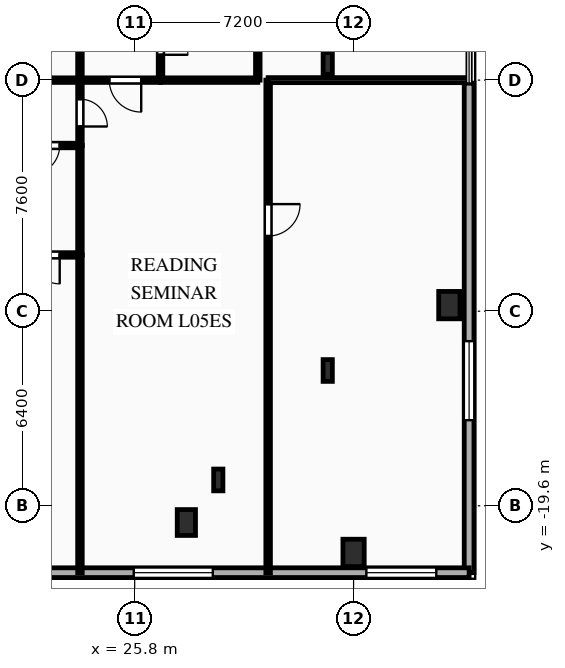
"""IFC4 building model, lengths in metres.
Left out: names, types, materials, properties, quantities, classifications, styles, units other than length and angle.
Written with IfcOpenShell. Run it as: python <this file> out.ifc"""

import sys

from ifc_helpers import new_model, si_unit, direction, frame, frame_2d, origin, origin_2d, place, context, subcontext, project, spatial, rectangle, i_section, extrude, element, fill, save


model = new_model("IFC4")
c1 = context("Model", 3, precision=1e-05, world=origin(), true_north=direction((0.0, 1.0)))
c2 = subcontext(c1, "Body", "Model", "MODEL_VIEW")
j1 = project(units=[si_unit("LENGTHUNIT", "METRE"), si_unit("PLANEANGLEUNIT", "RADIAN")], contexts=[c1])
p1 = place(None, origin())
s1 = spatial("IfcSite", under=j1, at=p1, CompositionType="ELEMENT")
p2 = place(p1, origin())
s2 = spatial("IfcBuilding", under=s1, at=p2, CompositionType="ELEMENT")
p3 = place(p2, frame((0.0, 0.0, 22.5)))
s3 = spatial("IfcBuildingStorey", under=s2, at=p3, CompositionType="ELEMENT", Elevation=22.5)
for number, where, z_axis, x_axis in (
    (1, (33.0, -21.15, 0.0), (0.0, 0.0, 1.0), (1.0, 0.0, 0.0)),
    (2, (36.15, -13.0, 0.0), (0.0, 0.0, 1.0), (1.0, 0.0, 0.0)),
):
    element("IfcColumn", number, at=place(p3, frame(where, z_axis=z_axis, x_axis=x_axis)), inside=s3, PredefinedType="COLUMN", context=c2, shape_type="SweptSolid", body=[
        extrude(rectangle(XDim=0.7, YDim=0.9, at=origin_2d()), origin(), (0.0, 0.0, 1.0), 4.5),
    ])
p4 = place(p3, frame((27.5, -20.15, 0.0), z_axis=(0.0, 0.0, 1.0), x_axis=(1.0, 0.0, 0.0)))
e3 = element("IfcColumn", 3, at=p4, inside=s3, PredefinedType="PILASTER", context=c2, shape_type="SweptSolid", body=[
    extrude(rectangle(XDim=0.6, YDim=0.85, at=origin_2d()), origin(), (0.0, 0.0, 1.0), 4.5),
])
for number, where, z_axis, x_axis in (
    (4, (28.55, -18.75, 0.0), (0.0, 0.0, 1.0), (1.0, 0.0, 0.0)),
    (5, (32.15, -15.15, 0.0), (0.0, 0.0, 1.0), (1.0, 0.0, 0.0)),
    (6, (32.15, -5.05, 0.0), (0.0, 0.0, 1.0), (1.0, 0.0, 0.0)),
):
    element("IfcColumn", number, at=place(p3, frame(where, z_axis=z_axis, x_axis=x_axis)), inside=s3, PredefinedType="COLUMN", context=c2, shape_type="SweptSolid", body=[
        extrude(i_section(OverallWidth=0.304, OverallDepth=0.716, WebThickness=0.021, FlangeThickness=0.04, FilletRadius=0.027, at=origin_2d()), origin(), (0.0, 0.0, 1.0), 4.5),
    ])
p5 = place(p3, frame((36.8, -5.7, 0.0), z_axis=(0.0, 0.0, 1.0), x_axis=(0.0, -1.0, 0.0)))
e7 = element("IfcWall", 7, at=p5, inside=s3, PredefinedType="SOLIDWALL", context=c2, shape_type="SweptSolid", body=[
    extrude(rectangle(XDim=16.1, YDim=0.32, at=frame_2d((8.05, 0.0))), origin(), (0.0, 0.0, 1.0), 4.16),
])
p6 = place(p5, frame((8.485, 0.0, 0.85)))
e8 = element("IfcOpeningElement", 8, at=p6, cuts=e7, PredefinedType="OPENING", context=c2, shape_type="SweptSolid", body=[
    extrude(rectangle(XDim=2.6, YDim=2.4, at=frame_2d((1.3, 1.2))), frame((0.0, 0.17, 0.0), z_axis=(0.0, -1.0, 0.0), x_axis=(1.0, 0.0, 0.0)), (0.0, 0.0, 1.0), 0.34),
])
p7 = place(p3, frame((36.8, -21.8, 0.0), z_axis=(0.0, 0.0, 1.0), x_axis=(-1.0, 0.0, 0.0)))
e9 = element("IfcWall", 9, at=p7, inside=s3, PredefinedType="SOLIDWALL", context=c2, shape_type="SweptSolid", body=[
    extrude(rectangle(XDim=73.6, YDim=0.32, at=frame_2d((36.8, 0.0))), origin(), (0.0, 0.0, 1.0), 4.16),
])
p8 = place(p7, frame((1.079, 0.0, 0.85)))
e10 = element("IfcOpeningElement", 10, at=p8, cuts=e9, PredefinedType="OPENING", context=c2, shape_type="SweptSolid", body=[
    extrude(rectangle(XDim=2.3, YDim=2.4, at=frame_2d((1.15, 1.2))), frame((0.0, 0.17, 0.0), z_axis=(0.0, -1.0, 0.0), x_axis=(1.0, 0.0, 0.0)), (0.0, 0.0, 1.0), 0.34),
])
p9 = place(p7, frame((8.431, 0.0, 0.85)))
e11 = element("IfcOpeningElement", 11, at=p9, cuts=e9, PredefinedType="OPENING", context=c2, shape_type="SweptSolid", body=[
    extrude(rectangle(XDim=2.6, YDim=2.4, at=frame_2d((1.3, 1.2))), frame((0.0, 0.17, 0.0), z_axis=(0.0, -1.0, 0.0), x_axis=(1.0, 0.0, 0.0)), (0.0, 0.0, 1.0), 0.34),
])
p10 = place(p7, frame((29.293, 0.0, 0.85)))
e12 = element("IfcOpeningElement", 12, at=p10, cuts=e9, PredefinedType="OPENING", context=c2, shape_type="SweptSolid", body=[
    extrude(rectangle(XDim=2.6, YDim=2.4, at=frame_2d((1.3, 1.2))), frame((0.0, 0.17, 0.0), z_axis=(0.0, -1.0, 0.0), x_axis=(1.0, 0.0, 0.0)), (0.0, 0.0, 1.0), 0.34),
])
p11 = place(p7, frame((49.195, 0.0, 0.85)))
e13 = element("IfcOpeningElement", 13, at=p11, cuts=e9, PredefinedType="OPENING", context=c2, shape_type="SweptSolid", body=[
    extrude(rectangle(XDim=2.6, YDim=2.4, at=frame_2d((1.3, 1.2))), frame((0.0, 0.17, 0.0), z_axis=(0.0, -1.0, 0.0), x_axis=(1.0, 0.0, 0.0)), (0.0, 0.0, 1.0), 0.34),
])
p12 = place(p7, frame((62.649, 0.0, 0.85)))
e14 = element("IfcOpeningElement", 14, at=p12, cuts=e9, PredefinedType="OPENING", context=c2, shape_type="SweptSolid", body=[
    extrude(rectangle(XDim=2.6, YDim=2.4, at=frame_2d((1.3, 1.2))), frame((0.0, 0.17, 0.0), z_axis=(0.0, -1.0, 0.0), x_axis=(1.0, 0.0, 0.0)), (0.0, 0.0, 1.0), 0.34),
])
p13 = place(p7, frame((70.301, 0.0, 0.85)))
e15 = element("IfcOpeningElement", 15, at=p13, cuts=e9, PredefinedType="OPENING", context=c2, shape_type="SweptSolid", body=[
    extrude(rectangle(XDim=2.3, YDim=2.4, at=frame_2d((1.15, 1.2))), frame((0.0, 0.17, 0.0), z_axis=(0.0, -1.0, 0.0), x_axis=(1.0, 0.0, 0.0)), (0.0, 0.0, 1.0), 0.34),
])
p14 = place(p3, frame((24.0, -5.6, 0.0), z_axis=(0.0, 0.0, 1.0), x_axis=(0.0, -1.0, 0.0)))
e16 = element("IfcWall", 16, at=p14, inside=s3, PredefinedType="PARTITIONING", context=c2, shape_type="SweptSolid", body=[
    extrude(rectangle(XDim=2.15, YDim=0.15, at=frame_2d((1.075, 0.0))), origin(), (0.0, 0.0, 1.0), 4.16),
])
p15 = place(p14, frame((0.625, 0.0, 0.0)))
e17 = element("IfcOpeningElement", 17, at=p15, cuts=e16, PredefinedType="OPENING", context=c2, shape_type="SweptSolid", body=[
    extrude(rectangle(XDim=0.9, YDim=2.1, at=frame_2d((0.45, 1.05))), frame((0.0, 0.085, 0.0), z_axis=(0.0, -1.0, 0.0), x_axis=(1.0, 0.0, 0.0)), (0.0, 0.0, 1.0), 0.17),
])
p16 = place(p3, frame((18.8, -5.6, 0.0), z_axis=(0.0, 0.0, 1.0), x_axis=(1.0, 0.0, 0.0)))
e18 = element("IfcWall", 18, at=p16, inside=s3, PredefinedType="PARTITIONING", context=c2, shape_type="SweptSolid", body=[
    extrude(rectangle(XDim=5.2, YDim=0.15, at=frame_2d((2.6, 0.0))), origin(), (0.0, 0.0, 1.0), 4.16),
])
p17 = place(p3, frame((24.0, -7.75, 0.0), z_axis=(0.0, 0.0, 1.0), x_axis=(-1.0, 0.0, 0.0)))
e19 = element("IfcWall", 19, at=p17, inside=s3, PredefinedType="PARTITIONING", context=c2, shape_type="SweptSolid", body=[
    extrude(rectangle(XDim=2.8, YDim=0.15, at=frame_2d((1.4, 0.0))), origin(), (0.0, 0.0, 1.0), 4.16),
])
p18 = place(p17, frame((0.666, 0.0, 0.0)))
e20 = element("IfcOpeningElement", 20, at=p18, cuts=e19, PredefinedType="OPENING", context=c2, shape_type="SweptSolid", body=[
    extrude(rectangle(XDim=0.95, YDim=2.1, at=frame_2d((0.475, 1.05))), frame((0.0, 0.085, 0.0), z_axis=(0.0, -1.0, 0.0), x_axis=(1.0, 0.0, 0.0)), (0.0, 0.0, 1.0), 0.17),
])
p19 = place(p3, frame((26.65, -5.6, 0.0), z_axis=(0.0, 0.0, 1.0), x_axis=(-1.0, 0.0, 0.0)))
e21 = element("IfcWall", 21, at=p19, inside=s3, PredefinedType="PARTITIONING", context=c2, shape_type="SweptSolid", body=[
    extrude(rectangle(XDim=2.65, YDim=0.15, at=frame_2d((1.325, 0.0))), origin(), (0.0, 0.0, 1.0), 4.16),
])
p20 = place(p19, frame((0.635, 0.0, 0.0)))
e22 = element("IfcOpeningElement", 22, at=p20, cuts=e21, PredefinedType="OPENING", context=c2, shape_type="SweptSolid", body=[
    extrude(rectangle(XDim=1.05, YDim=2.15, at=frame_2d((0.525, 1.075))), frame((0.0, 0.085, 0.0), z_axis=(0.0, -1.0, 0.0), x_axis=(1.0, 0.0, 0.0)), (0.0, 0.0, 1.0), 0.17),
])
p21 = place(p3, frame((26.65, -3.25, 0.0), z_axis=(0.0, 0.0, 1.0), x_axis=(0.0, -1.0, 0.0)))
e23 = element("IfcWall", 23, at=p21, inside=s3, PredefinedType="PLUMBINGWALL", context=c2, shape_type="SweptSolid", body=[
    extrude(rectangle(XDim=2.35, YDim=0.15, at=frame_2d((1.175, 0.0))), origin(), (0.0, 0.0, 1.0), 4.16),
])
p22 = place(p21, frame((0.616, 0.0, 0.0)))
e24 = element("IfcOpeningElement", 24, at=p22, cuts=e23, PredefinedType="OPENING", context=c2, shape_type="SweptSolid", body=[
    extrude(rectangle(XDim=0.9, YDim=2.1, at=frame_2d((0.45, 1.05))), frame((0.0, 0.085, 0.0), z_axis=(0.0, -1.0, 0.0), x_axis=(1.0, 0.0, 0.0)), (0.0, 0.0, 1.0), 0.17),
])
p23 = place(p3, frame((24.0, -5.6, 0.0), z_axis=(0.0, 0.0, 1.0), x_axis=(0.0, 1.0, 0.0)))
e25 = element("IfcWall", 25, at=p23, inside=s3, PredefinedType="PARTITIONING", context=c2, shape_type="SweptSolid", body=[
    extrude(rectangle(XDim=14.1, YDim=0.15, at=frame_2d((7.05, 0.0))), origin(), (0.0, 0.0, 1.0), 4.16),
])
p24 = place(p3, frame((30.19, -5.6, 0.0), z_axis=(0.0, 0.0, 1.0), x_axis=(0.0, -1.0, 0.0)))
e26 = element("IfcWall", 26, at=p24, inside=s3, PredefinedType="PARTITIONING", context=c2, shape_type="SweptSolid", body=[
    extrude(rectangle(XDim=16.2, YDim=0.15, at=frame_2d((8.1, 0.0))), origin(), (0.0, 0.0, 1.0), 4.16),
])
p25 = place(p24, frame((4.077, 0.0, 0.0)))
e27 = element("IfcOpeningElement", 27, at=p25, cuts=e26, PredefinedType="OPENING", context=c2, shape_type="SweptSolid", body=[
    extrude(rectangle(XDim=1.05, YDim=2.15, at=frame_2d((0.525, 1.075))), frame((0.0, 0.085, 0.0), z_axis=(0.0, -1.0, 0.0), x_axis=(1.0, 0.0, 0.0)), (0.0, 0.0, 1.0), 0.17),
])
p26 = place(p3, frame((26.65, -5.6, 0.0), z_axis=(0.0, 0.0, 1.0), x_axis=(1.0, 0.0, 0.0)))
e28 = element("IfcWall", 28, at=p26, inside=s3, PredefinedType="PLUMBINGWALL", context=c2, shape_type="SweptSolid", body=[
    extrude(rectangle(XDim=3.2, YDim=0.15, at=frame_2d((1.6, 0.0))), origin(), (0.0, 0.0, 1.0), 4.16),
])
p27 = place(p3, frame((24.0, -11.35, 0.0), z_axis=(0.0, 0.0, 1.0), x_axis=(0.0, 1.0, 0.0)))
e29 = element("IfcWall", 29, at=p27, inside=s3, PredefinedType="PARTITIONING", context=c2, shape_type="SweptSolid", body=[
    extrude(rectangle(XDim=3.6, YDim=0.15, at=frame_2d((1.8, 0.0))), origin(), (0.0, 0.0, 1.0), 4.16),
])
p28 = place(p3, frame((24.0, -21.8, 0.0), z_axis=(0.0, 0.0, 1.0), x_axis=(0.0, 1.0, 0.0)))
e30 = element("IfcWall", 30, at=p28, inside=s3, PredefinedType="PARTITIONING", context=c2, shape_type="SweptSolid", body=[
    extrude(rectangle(XDim=10.45, YDim=0.15, at=frame_2d((5.225, 0.0))), origin(), (0.0, 0.0, 1.0), 4.16),
])
p29 = place(p3, frame((30.19, -5.6, 0.0), z_axis=(0.0, 0.0, 1.0), x_axis=(1.0, 0.0, 0.0)))
e31 = element("IfcWall", 31, at=p29, inside=s3, PredefinedType="PARTITIONING", context=c2, shape_type="SweptSolid", body=[
    extrude(rectangle(XDim=6.61, YDim=0.165, at=frame_2d((3.305, 0.0))), origin(), (0.0, 0.0, 1.0), 4.16),
])
p30 = place(p3, frame((29.85, -3.25, 0.0), z_axis=(0.0, 0.0, 1.0), x_axis=(0.0, -1.0, 0.0)))
e32 = element("IfcWall", 32, at=p30, inside=s3, PredefinedType="PLUMBINGWALL", context=c2, shape_type="SweptSolid", body=[
    extrude(rectangle(XDim=2.35, YDim=0.15, at=frame_2d((1.175, 0.0))), origin(), (0.0, 0.0, 1.0), 4.16),
])
p31 = place(p3, frame((24.0, -11.35, 0.0), z_axis=(0.0, 0.0, 1.0), x_axis=(-1.0, 0.0, 0.0)))
e33 = element("IfcWall", 33, at=p31, inside=s3, PredefinedType="PARTITIONING", context=c2, shape_type="SweptSolid", body=[
    extrude(rectangle(XDim=2.8, YDim=0.15, at=frame_2d((1.4, 0.0))), origin(), (0.0, 0.0, 1.0), 4.16),
])
p32 = place(p31, frame((0.666, 0.0, 0.0)))
e34 = element("IfcOpeningElement", 34, at=p32, cuts=e33, PredefinedType="OPENING", context=c2, shape_type="SweptSolid", body=[
    extrude(rectangle(XDim=0.95, YDim=2.1, at=frame_2d((0.475, 1.05))), frame((0.0, 0.085, 0.0), z_axis=(0.0, -1.0, 0.0), x_axis=(1.0, 0.0, 0.0)), (0.0, 0.0, 1.0), 0.17),
])
p33 = place(p6, origin())
e35 = element("IfcWindow", 35, at=p33, inside=s3, PartitioningType="SINGLE_PANEL", PredefinedType="WINDOW", context=c2, shape_type="SweptSolid", body=[
    extrude(rectangle(XDim=2.6, YDim=2.4, at=frame_2d((1.3, 1.2))), frame((0.0, 0.03, 0.0), z_axis=(0.0, -1.0, 0.0), x_axis=(1.0, 0.0, 0.0)), (0.0, 0.0, 1.0), 0.06),
])
fill(e8, e35)
p34 = place(p8, origin())
e36 = element("IfcWindow", 36, at=p34, inside=s3, PartitioningType="SINGLE_PANEL", PredefinedType="WINDOW", context=c2, shape_type="SweptSolid", body=[
    extrude(rectangle(XDim=2.3, YDim=2.4, at=frame_2d((1.15, 1.2))), frame((0.0, 0.03, 0.0), z_axis=(0.0, -1.0, 0.0), x_axis=(1.0, 0.0, 0.0)), (0.0, 0.0, 1.0), 0.06),
])
fill(e10, e36)
p35 = place(p9, origin())
e37 = element("IfcWindow", 37, at=p35, inside=s3, PartitioningType="SINGLE_PANEL", PredefinedType="WINDOW", context=c2, shape_type="SweptSolid", body=[
    extrude(rectangle(XDim=2.6, YDim=2.4, at=frame_2d((1.3, 1.2))), frame((0.0, 0.03, 0.0), z_axis=(0.0, -1.0, 0.0), x_axis=(1.0, 0.0, 0.0)), (0.0, 0.0, 1.0), 0.06),
])
fill(e11, e37)
p36 = place(p15, origin())
e38 = element("IfcDoor", 38, at=p36, inside=s3, OperationType="SINGLE_SWING_RIGHT", PredefinedType="DOOR", context=c2, shape_type="SweptSolid", body=[
    extrude(rectangle(XDim=0.9, YDim=2.1, at=frame_2d((0.45, 1.05))), frame((0.0, 0.025, 0.0), z_axis=(0.0, -1.0, 0.0), x_axis=(1.0, 0.0, 0.0)), (0.0, 0.0, 1.0), 0.05),
])
fill(e17, e38)
p37 = place(p18, origin())
e39 = element("IfcDoor", 39, at=p37, inside=s3, OperationType="SINGLE_SWING_RIGHT", PredefinedType="DOOR", context=c2, shape_type="SweptSolid", body=[
    extrude(rectangle(XDim=0.95, YDim=2.1, at=frame_2d((0.475, 1.05))), frame((0.0, 0.025, 0.0), z_axis=(0.0, -1.0, 0.0), x_axis=(1.0, 0.0, 0.0)), (0.0, 0.0, 1.0), 0.05),
])
fill(e20, e39)
p38 = place(p20, origin())
e40 = element("IfcDoor", 40, at=p38, inside=s3, OperationType="SINGLE_SWING_LEFT", PredefinedType="DOOR", context=c2, shape_type="SweptSolid", body=[
    extrude(rectangle(XDim=1.05, YDim=2.15, at=frame_2d((0.525, 1.075))), frame((0.0, 0.025, 0.0), z_axis=(0.0, -1.0, 0.0), x_axis=(1.0, 0.0, 0.0)), (0.0, 0.0, 1.0), 0.05),
])
fill(e22, e40)
p39 = place(p22, origin())
e41 = element("IfcDoor", 41, at=p39, inside=s3, OperationType="SINGLE_SWING_RIGHT", PredefinedType="DOOR", context=c2, shape_type="SweptSolid", body=[
    extrude(rectangle(XDim=0.9, YDim=2.1, at=frame_2d((0.45, 1.05))), frame((0.0, 0.025, 0.0), z_axis=(0.0, -1.0, 0.0), x_axis=(1.0, 0.0, 0.0)), (0.0, 0.0, 1.0), 0.05),
])
fill(e24, e41)
p40 = place(p25, origin())
e42 = element("IfcDoor", 42, at=p40, inside=s3, OperationType="SINGLE_SWING_LEFT", PredefinedType="DOOR", context=c2, shape_type="SweptSolid", body=[
    extrude(rectangle(XDim=1.05, YDim=2.15, at=frame_2d((0.525, 1.075))), frame((0.0, 0.025, 0.0), z_axis=(0.0, -1.0, 0.0), x_axis=(1.0, 0.0, 0.0)), (0.0, 0.0, 1.0), 0.05),
])
fill(e27, e42)
p41 = place(p32, origin())
e43 = element("IfcDoor", 43, at=p41, inside=s3, OperationType="SINGLE_SWING_LEFT", PredefinedType="DOOR", context=c2, shape_type="SweptSolid", body=[
    extrude(rectangle(XDim=0.95, YDim=2.1, at=frame_2d((0.475, 1.05))), frame((0.0, 0.025, 0.0), z_axis=(0.0, -1.0, 0.0), x_axis=(1.0, 0.0, 0.0)), (0.0, 0.0, 1.0), 0.05),
])
fill(e34, e43)
save(model, sys.argv[1])
